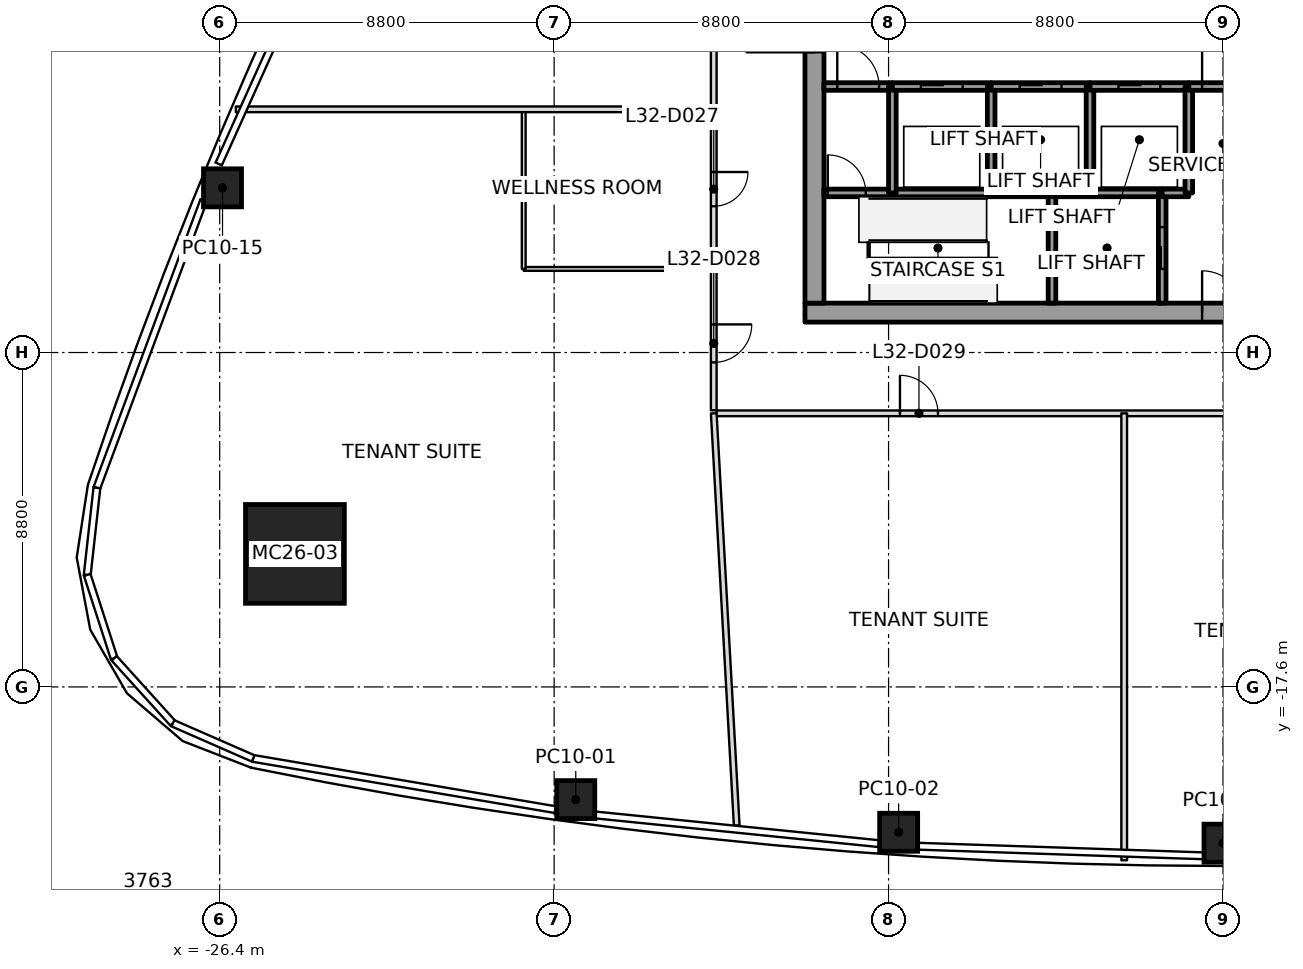
"""IFC4 building model, lengths in metres.
Left out: names, types, materials, properties, quantities, classifications, styles, units other than length and angle.
Written with IfcOpenShell. Run it as: python <this file> out.ifc"""

import sys

from ifc_helpers import new_model, si_unit, direction, frame, frame_2d, origin, origin_2d, place, context, subcontext, project, spatial, rectangle, extrude, element, fill, save


model = new_model("IFC4")
c1 = context("Model", 3, precision=1e-05, world=origin(), true_north=direction((0.0, 1.0)))
c2 = subcontext(c1, "Body", "Model", "MODEL_VIEW")
j1 = project(units=[si_unit("LENGTHUNIT", "METRE"), si_unit("PLANEANGLEUNIT", "RADIAN")], contexts=[c1])
p1 = place(None, origin())
s1 = spatial("IfcSite", under=j1, at=p1, CompositionType="ELEMENT")
p2 = place(p1, origin())
s2 = spatial("IfcBuilding", under=s1, at=p2, CompositionType="ELEMENT")
p3 = place(p2, frame((0.0, 0.0, 149.8)))
s3 = spatial("IfcBuildingStorey", under=s2, at=p3, CompositionType="ELEMENT", Elevation=149.8)
p4 = place(p3, frame((-24.421, -14.099, 0.0), z_axis=(0.02806141744, 0.01622681965, 0.999474485505), x_axis=(0.999606200887, -0.000455526946, -0.028057719863)))
e1 = element("IfcColumn", 1, at=p4, inside=s3, PredefinedType="COLUMN", context=c2, shape_type="SweptSolid", body=[
    extrude(rectangle(XDim=2.6, YDim=2.6, at=origin_2d()), origin(), (0.0, 0.0, 1.0), 4.002),
])
p5 = place(p3, frame((-17.031, -20.566, 0.0), z_axis=(0.017696448434, 0.010495824588, 0.999788314284), x_axis=(-0.9908324592, 0.134130035979, 0.016129824645)))
e2 = element("IfcColumn", 2, at=p5, inside=s3, PredefinedType="COLUMN", context=c2, shape_type="SweptSolid", body=[
    extrude(rectangle(XDim=1.0, YDim=1.0, at=origin_2d()), origin(), (0.0, 0.0, 1.0), 4.001),
])
p6 = place(p3, frame((-8.535, -21.425, 0.0), z_axis=(0.008849199152, 0.01116829962, 0.999898475225), x_axis=(-0.997705241451, 0.067223373028, 0.008078941818)))
e3 = element("IfcColumn", 3, at=p6, inside=s3, PredefinedType="COLUMN", context=c2, shape_type="SweptSolid", body=[
    extrude(rectangle(XDim=1.0, YDim=1.0, at=origin_2d()), origin(), (0.0, 0.0, 1.0), 4.0),
])
p7 = place(p3, frame((0.0, -21.711, 0.0), z_axis=(0.0, 0.01141283087, 0.999934871525), x_axis=(1.0, 0.0, 0.0)))
e4 = element("IfcColumn", 4, at=p7, inside=s3, PredefinedType="COLUMN", context=c2, shape_type="SweptSolid", body=[
    extrude(rectangle(XDim=1.0, YDim=1.0, at=origin_2d()), origin(), (0.0, 0.0, 1.0), 4.0),
])
p8 = place(p3, frame((-26.326, -4.466, 0.0), z_axis=(0.017879535448, 0.010068680372, 0.999789449778), x_axis=(0.379426178831, 0.925081893574, -0.016101707937)))
e5 = element("IfcColumn", 5, at=p8, inside=s3, PredefinedType="COLUMN", context=c2, shape_type="SweptSolid", body=[
    extrude(rectangle(XDim=1.0, YDim=1.0, at=origin_2d()), origin(), (0.0, 0.0, 1.0), 4.001),
])
p9 = place(p3, frame((-11.0, -7.75, 0.0), z_axis=(0.0, 0.0, 1.0), x_axis=(1.0, 0.0, 0.0)))
e6 = element("IfcWall", 6, at=p9, inside=s3, PredefinedType="SHEAR", context=c2, shape_type="SweptSolid", body=[
    extrude(rectangle(XDim=22.0, YDim=0.5, at=frame_2d((11.0, 0.0))), origin(), (0.0, 0.0, 1.0), 4.0),
])
p10 = place(p9, frame((10.45, 0.0, 0.0)))
e7 = element("IfcOpeningElement", 7, at=p10, cuts=e6, PredefinedType="OPENING", context=c2, shape_type="SweptSolid", body=[
    extrude(rectangle(XDim=1.1, YDim=2.1, at=frame_2d((0.55, 1.05))), frame((0.0, 0.25, 0.0), z_axis=(0.0, -1.0, 0.0), x_axis=(1.0, 0.0, 0.0)), (0.0, 0.0, 1.0), 0.5),
])
p11 = place(p3, frame((-10.75, -7.5, 0.0), z_axis=(0.0, 0.0, 1.0), x_axis=(0.0, 1.0, 0.0)))
e8 = element("IfcWall", 8, at=p11, inside=s3, PredefinedType="SHEAR", context=c2, shape_type="SweptSolid", body=[
    extrude(rectangle(XDim=15.0, YDim=0.5, at=frame_2d((7.5, 0.0))), origin(), (0.0, 0.0, 1.0), 4.0),
])
p12 = place(p11, frame((6.6, 0.0, 0.0)))
e9 = element("IfcOpeningElement", 9, at=p12, cuts=e8, PredefinedType="OPENING", context=c2, shape_type="SweptSolid", body=[
    extrude(rectangle(XDim=1.8, YDim=2.1, at=frame_2d((0.9, 1.05))), frame((0.0, 0.25, 0.0), z_axis=(0.0, -1.0, 0.0), x_axis=(1.0, 0.0, 0.0)), (0.0, 0.0, 1.0), 0.5),
])
p13 = place(p3, frame((-10.5, -4.6, 0.0), z_axis=(0.0, 0.0, 1.0), x_axis=(1.0, 0.0, 0.0)))
e10 = element("IfcWall", 10, at=p13, inside=s3, PredefinedType="SOLIDWALL", context=c2, shape_type="SweptSolid", body=[
    extrude(rectangle(XDim=1.8, YDim=0.2, at=frame_2d((0.9, 0.0))), origin(), (0.0, 0.0, 1.0), 3.85),
])
p14 = place(p13, frame((0.1, 0.0, 0.0)))
e11 = element("IfcOpeningElement", 11, at=p14, cuts=e10, PredefinedType="OPENING", context=c2, shape_type="SweptSolid", body=[
    extrude(rectangle(XDim=1.0, YDim=2.1, at=frame_2d((0.5, 1.05))), frame((0.0, 0.1, 0.0), z_axis=(0.0, -1.0, 0.0), x_axis=(1.0, 0.0, 0.0)), (0.0, 0.0, 1.0), 0.2),
])
p15 = place(p3, frame((-10.5, -1.8, 0.0), z_axis=(0.0, 0.0, 1.0), x_axis=(1.0, 0.0, 0.0)))
e12 = element("IfcWall", 12, at=p15, inside=s3, PredefinedType="SOLIDWALL", context=c2, shape_type="SweptSolid", body=[
    extrude(rectangle(XDim=1.8, YDim=0.2, at=frame_2d((0.9, 0.0))), origin(), (0.0, 0.0, 1.0), 3.85),
])
p16 = place(p15, frame((0.35, 0.0, 0.0)))
e13 = element("IfcOpeningElement", 13, at=p16, cuts=e12, PredefinedType="OPENING", context=c2, shape_type="SweptSolid", body=[
    extrude(rectangle(XDim=1.1, YDim=2.1, at=frame_2d((0.55, 1.05))), frame((0.0, 0.1, 0.0), z_axis=(0.0, -1.0, 0.0), x_axis=(1.0, 0.0, 0.0)), (0.0, 0.0, 1.0), 0.2),
])
p17 = place(p3, frame((-8.7, -4.6, 0.0), z_axis=(0.0, 0.0, 1.0), x_axis=(1.0, 0.0, 0.0)))
e14 = element("IfcWall", 14, at=p17, inside=s3, PredefinedType="SOLIDWALL", context=c2, shape_type="SweptSolid", body=[
    extrude(rectangle(XDim=2.6, YDim=0.2, at=frame_2d((1.3, 0.0))), origin(), (0.0, 0.0, 1.0), 3.85),
])
p18 = place(p3, frame((-8.7, -4.6, 0.0), z_axis=(0.0, 0.0, 1.0), x_axis=(0.0, 1.0, 0.0)))
e15 = element("IfcWall", 15, at=p18, inside=s3, PredefinedType="SOLIDWALL", context=c2, shape_type="SweptSolid", body=[
    extrude(rectangle(XDim=2.8, YDim=0.2, at=frame_2d((1.4, 0.0))), origin(), (0.0, 0.0, 1.0), 3.85),
])
p19 = place(p3, frame((-8.7, -1.8, 0.0), z_axis=(0.0, 0.0, 1.0), x_axis=(1.0, 0.0, 0.0)))
e16 = element("IfcWall", 16, at=p19, inside=s3, PredefinedType="SOLIDWALL", context=c2, shape_type="SweptSolid", body=[
    extrude(rectangle(XDim=2.6, YDim=0.2, at=frame_2d((1.3, 0.0))), origin(), (0.0, 0.0, 1.0), 3.85),
])
p20 = place(p19, frame((0.75, 0.0, 0.0)))
e17 = element("IfcOpeningElement", 17, at=p20, cuts=e16, PredefinedType="OPENING", context=c2, shape_type="SweptSolid", body=[
    extrude(rectangle(XDim=1.1, YDim=2.1, at=frame_2d((0.55, 1.05))), frame((0.0, 0.1, 0.0), z_axis=(0.0, -1.0, 0.0), x_axis=(1.0, 0.0, 0.0)), (0.0, 0.0, 1.0), 0.2),
])
p21 = place(p3, frame((-6.1, -4.6, 0.0), z_axis=(0.0, 0.0, 1.0), x_axis=(1.0, 0.0, 0.0)))
e18 = element("IfcWall", 18, at=p21, inside=s3, PredefinedType="SOLIDWALL", context=c2, shape_type="SweptSolid", body=[
    extrude(rectangle(XDim=1.6, YDim=0.2, at=frame_2d((0.8, 0.0))), origin(), (0.0, 0.0, 1.0), 3.85),
])
p22 = place(p3, frame((-6.1, -4.6, 0.0), z_axis=(0.0, 0.0, 1.0), x_axis=(0.0, 1.0, 0.0)))
e19 = element("IfcWall", 19, at=p22, inside=s3, PredefinedType="SOLIDWALL", context=c2, shape_type="SweptSolid", body=[
    extrude(rectangle(XDim=2.8, YDim=0.2, at=frame_2d((1.4, 0.0))), origin(), (0.0, 0.0, 1.0), 3.85),
])
p23 = place(p3, frame((-6.1, -1.8, 0.0), z_axis=(0.0, 0.0, 1.0), x_axis=(1.0, 0.0, 0.0)))
e20 = element("IfcWall", 20, at=p23, inside=s3, PredefinedType="SOLIDWALL", context=c2, shape_type="SweptSolid", body=[
    extrude(rectangle(XDim=2.6, YDim=0.2, at=frame_2d((1.3, 0.0))), origin(), (0.0, 0.0, 1.0), 3.85),
])
p24 = place(p23, frame((0.75, 0.0, 0.0)))
e21 = element("IfcOpeningElement", 21, at=p24, cuts=e20, PredefinedType="OPENING", context=c2, shape_type="SweptSolid", body=[
    extrude(rectangle(XDim=1.1, YDim=2.1, at=frame_2d((0.55, 1.05))), frame((0.0, 0.1, 0.0), z_axis=(0.0, -1.0, 0.0), x_axis=(1.0, 0.0, 0.0)), (0.0, 0.0, 1.0), 0.2),
])
p25 = place(p3, frame((-4.5, -4.6, 0.0), z_axis=(0.0, 0.0, 1.0), x_axis=(0.0, -1.0, 0.0)))
e22 = element("IfcWall", 22, at=p25, inside=s3, PredefinedType="SOLIDWALL", context=c2, shape_type="SweptSolid", body=[
    extrude(rectangle(XDim=2.9, YDim=0.2, at=frame_2d((1.45, 0.0))), origin(), (0.0, 0.0, 1.0), 3.85),
])
p26 = place(p3, frame((-4.5, -4.6, 0.0), z_axis=(0.0, 0.0, 1.0), x_axis=(1.0, 0.0, 0.0)))
e23 = element("IfcWall", 23, at=p26, inside=s3, PredefinedType="SOLIDWALL", context=c2, shape_type="SweptSolid", body=[
    extrude(rectangle(XDim=1.0, YDim=0.2, at=frame_2d((0.5, 0.0))), origin(), (0.0, 0.0, 1.0), 3.85),
])
p27 = place(p3, frame((-3.5, -4.6, 0.0), z_axis=(0.0, 0.0, 1.0), x_axis=(1.0, 0.0, 0.0)))
e24 = element("IfcWall", 24, at=p27, inside=s3, PredefinedType="SOLIDWALL", context=c2, shape_type="SweptSolid", body=[
    extrude(rectangle(XDim=1.9, YDim=0.2, at=frame_2d((0.95, 0.0))), origin(), (0.0, 0.0, 1.0), 3.85),
])
p28 = place(p3, frame((-3.5, -4.6, 0.0), z_axis=(0.0, 0.0, 1.0), x_axis=(0.0, 1.0, 0.0)))
e25 = element("IfcWall", 25, at=p28, inside=s3, PredefinedType="SOLIDWALL", context=c2, shape_type="SweptSolid", body=[
    extrude(rectangle(XDim=2.8, YDim=0.2, at=frame_2d((1.4, 0.0))), origin(), (0.0, 0.0, 1.0), 3.85),
])
p29 = place(p3, frame((-3.5, -1.8, 0.0), z_axis=(0.0, 0.0, 1.0), x_axis=(1.0, 0.0, 0.0)))
e26 = element("IfcWall", 26, at=p29, inside=s3, PredefinedType="SOLIDWALL", context=c2, shape_type="SweptSolid", body=[
    extrude(rectangle(XDim=2.6, YDim=0.2, at=frame_2d((1.3, 0.0))), origin(), (0.0, 0.0, 1.0), 3.85),
])
p30 = place(p29, frame((0.75, 0.0, 0.0)))
e27 = element("IfcOpeningElement", 27, at=p30, cuts=e26, PredefinedType="OPENING", context=c2, shape_type="SweptSolid", body=[
    extrude(rectangle(XDim=1.1, YDim=2.1, at=frame_2d((0.55, 1.05))), frame((0.0, 0.1, 0.0), z_axis=(0.0, -1.0, 0.0), x_axis=(1.0, 0.0, 0.0)), (0.0, 0.0, 1.0), 0.2),
])
p31 = place(p3, frame((-1.6, -7.5, 0.0), z_axis=(0.0, 0.0, 1.0), x_axis=(0.0, 1.0, 0.0)))
e28 = element("IfcWall", 28, at=p31, inside=s3, PredefinedType="SOLIDWALL", context=c2, shape_type="SweptSolid", body=[
    extrude(rectangle(XDim=2.9, YDim=0.2, at=frame_2d((1.45, 0.0))), origin(), (0.0, 0.0, 1.0), 3.85),
])
p32 = place(p31, frame((0.9, 0.0, 0.0)))
e29 = element("IfcOpeningElement", 29, at=p32, cuts=e28, PredefinedType="OPENING", context=c2, shape_type="SweptSolid", body=[
    extrude(rectangle(XDim=1.1, YDim=2.1, at=frame_2d((0.55, 1.05))), frame((0.0, 0.1, 0.0), z_axis=(0.0, -1.0, 0.0), x_axis=(1.0, 0.0, 0.0)), (0.0, 0.0, 1.0), 0.2),
])
p33 = place(p3, frame((-1.6, -4.6, 0.0), z_axis=(0.0, 0.0, 1.0), x_axis=(1.0, 0.0, 0.0)))
e30 = element("IfcWall", 30, at=p33, inside=s3, PredefinedType="SOLIDWALL", context=c2, shape_type="SweptSolid", body=[
    extrude(rectangle(XDim=0.7, YDim=0.2, at=frame_2d((0.35, 0.0))), origin(), (0.0, 0.0, 1.0), 3.85),
])
p34 = place(p3, frame((-0.9, -4.6, 0.0), z_axis=(0.0, 0.0, 1.0), x_axis=(0.0, 1.0, 0.0)))
e31 = element("IfcWall", 31, at=p34, inside=s3, PredefinedType="SOLIDWALL", context=c2, shape_type="SweptSolid", body=[
    extrude(rectangle(XDim=2.8, YDim=0.2, at=frame_2d((1.4, 0.0))), origin(), (0.0, 0.0, 1.0), 3.85),
])
p35 = place(p3, frame((-0.9, -1.8, 0.0), z_axis=(0.0, 0.0, 1.0), x_axis=(1.0, 0.0, 0.0)))
e32 = element("IfcWall", 32, at=p35, inside=s3, PredefinedType="SOLIDWALL", context=c2, shape_type="SweptSolid", body=[
    extrude(rectangle(XDim=1.8, YDim=0.2, at=frame_2d((0.9, 0.0))), origin(), (0.0, 0.0, 1.0), 3.85),
])
p36 = place(p35, frame((0.35, 0.0, 0.0)))
e33 = element("IfcOpeningElement", 33, at=p36, cuts=e32, PredefinedType="OPENING", context=c2, shape_type="SweptSolid", body=[
    extrude(rectangle(XDim=1.1, YDim=2.1, at=frame_2d((0.55, 1.05))), frame((0.0, 0.1, 0.0), z_axis=(0.0, -1.0, 0.0), x_axis=(1.0, 0.0, 0.0)), (0.0, 0.0, 1.0), 0.2),
])
p37 = place(p3, frame((-13.4, -2.4, 0.0), z_axis=(0.0, 0.0, 1.0), x_axis=(-1.0, 0.0, 0.0)))
e34 = element("IfcWall", 34, at=p37, inside=s3, PredefinedType="PARTITIONING", context=c2, shape_type="SweptSolid", body=[
    extrude(rectangle(XDim=12.576, YDim=0.15, at=frame_2d((6.288, 0.0))), origin(), (0.0, 0.0, 1.0), 3.234),
])
p38 = place(p3, frame((-13.4, -10.4, 0.0), z_axis=(0.0, 0.0, 1.0), x_axis=(0.055628111687, -0.998451557758, 0.0)))
e35 = element("IfcWall", 35, at=p38, inside=s3, PredefinedType="PARTITIONING", context=c2, shape_type="SweptSolid", body=[
    extrude(rectangle(XDim=10.862, YDim=0.15, at=frame_2d((5.431, 0.0))), origin(), (0.0, 0.0, 1.0), 3.234),
])
p39 = place(p3, frame((-2.6, -10.4, 0.0), z_axis=(0.0, 0.0, 1.0), x_axis=(0.0, -1.0, 0.0)))
e36 = element("IfcWall", 36, at=p39, inside=s3, PredefinedType="PARTITIONING", context=c2, shape_type="SweptSolid", body=[
    extrude(rectangle(XDim=11.762, YDim=0.15, at=frame_2d((5.881, 0.0))), origin(), (0.0, 0.0, 1.0), 3.234),
])
p40 = place(p3, frame((-13.4, 10.32, 0.0), z_axis=(0.0, 0.0, 1.0), x_axis=(0.0, -1.0, 0.0)))
e37 = element("IfcWall", 37, at=p40, inside=s3, PredefinedType="PARTITIONING", context=c2, shape_type="SweptSolid", body=[
    extrude(rectangle(XDim=20.64, YDim=0.15, at=frame_2d((10.32, 0.0))), origin(), (0.0, 0.0, 1.0), 3.166),
])
p41 = place(p40, frame((5.82, 0.0, 0.0)))
e38 = element("IfcOpeningElement", 38, at=p41, cuts=e37, PredefinedType="OPENING", context=c2, shape_type="SweptSolid", body=[
    extrude(rectangle(XDim=1.0, YDim=2.1, at=frame_2d((0.5, 1.05))), frame((0.0, 0.075, 0.0), z_axis=(0.0, -1.0, 0.0), x_axis=(1.0, 0.0, 0.0)), (0.0, 0.0, 1.0), 0.15),
])
p42 = place(p40, frame((14.37, 0.0, 0.0)))
e39 = element("IfcOpeningElement", 39, at=p42, cuts=e37, PredefinedType="OPENING", context=c2, shape_type="SweptSolid", body=[
    extrude(rectangle(XDim=0.9, YDim=2.1, at=frame_2d((0.45, 1.05))), frame((0.0, 0.075, 0.0), z_axis=(0.0, -1.0, 0.0), x_axis=(1.0, 0.0, 0.0)), (0.0, 0.0, 1.0), 0.15),
])
p43 = place(p40, frame((18.38, 0.0, 0.0)))
e40 = element("IfcOpeningElement", 40, at=p43, cuts=e37, PredefinedType="OPENING", context=c2, shape_type="SweptSolid", body=[
    extrude(rectangle(XDim=1.0, YDim=2.1, at=frame_2d((0.5, 1.05))), frame((0.0, 0.075, 0.0), z_axis=(0.0, -1.0, 0.0), x_axis=(1.0, 0.0, 0.0)), (0.0, 0.0, 1.0), 0.15),
])
p44 = place(p3, frame((-13.32, -10.4, 0.0), z_axis=(0.0, 0.0, 1.0), x_axis=(1.0, 0.0, 0.0)))
e41 = element("IfcWall", 41, at=p44, inside=s3, PredefinedType="PARTITIONING", context=c2, shape_type="SweptSolid", body=[
    extrude(rectangle(XDim=26.64, YDim=0.15, at=frame_2d((13.32, 0.0))), origin(), (0.0, 0.0, 1.0), 3.317),
])
p45 = place(p44, frame((4.82, 0.0, 0.0)))
e42 = element("IfcOpeningElement", 42, at=p45, cuts=e41, PredefinedType="OPENING", context=c2, shape_type="SweptSolid", body=[
    extrude(rectangle(XDim=1.0, YDim=2.1, at=frame_2d((0.5, 1.05))), frame((0.0, 0.075, 0.0), z_axis=(0.0, -1.0, 0.0), x_axis=(1.0, 0.0, 0.0)), (0.0, 0.0, 1.0), 0.15),
])
p46 = place(p44, frame((14.22, 0.0, 0.0)))
e43 = element("IfcOpeningElement", 43, at=p46, cuts=e41, PredefinedType="OPENING", context=c2, shape_type="SweptSolid", body=[
    extrude(rectangle(XDim=1.0, YDim=2.1, at=frame_2d((0.5, 1.05))), frame((0.0, 0.075, 0.0), z_axis=(0.0, -1.0, 0.0), x_axis=(1.0, 0.0, 0.0)), (0.0, 0.0, 1.0), 0.15),
])
p47 = place(p44, frame((22.22, 0.0, 0.0)))
e44 = element("IfcOpeningElement", 44, at=p47, cuts=e41, PredefinedType="OPENING", context=c2, shape_type="SweptSolid", body=[
    extrude(rectangle(XDim=1.0, YDim=2.1, at=frame_2d((0.5, 1.05))), frame((0.0, 0.075, 0.0), z_axis=(0.0, -1.0, 0.0), x_axis=(1.0, 0.0, 0.0)), (0.0, 0.0, 1.0), 0.15),
])
p48 = place(p3, frame((-13.43, -6.6, 0.0), z_axis=(0.0, 0.0, 1.0), x_axis=(-1.0, 0.0, 0.0)))
e45 = element("IfcWall", 45, at=p48, inside=s3, PredefinedType="PARTITIONING", context=c2, shape_type="SweptSolid", body=[
    extrude(rectangle(XDim=4.97, YDim=0.1, at=frame_2d((2.485, 0.0))), origin(), (0.0, 0.0, 1.0), 3.247),
])
p49 = place(p3, frame((-18.4, -6.6, 0.0), z_axis=(0.0, 0.0, 1.0), x_axis=(0.0, 1.0, 0.0)))
e46 = element("IfcWall", 46, at=p49, inside=s3, PredefinedType="PARTITIONING", context=c2, shape_type="SweptSolid", body=[
    extrude(rectangle(XDim=4.17, YDim=0.1, at=frame_2d((2.085, 0.0))), origin(), (0.0, 0.0, 1.0), 3.247),
])
p50 = place(p42, origin())
e47 = element("IfcDoor", 47, at=p50, inside=s3, OperationType="SINGLE_SWING_LEFT", PredefinedType="DOOR", context=c2, shape_type="SweptSolid", body=[
    extrude(rectangle(XDim=0.9, YDim=2.1, at=frame_2d((0.45, 1.05))), frame((0.0, 0.025, 0.0), z_axis=(0.0, -1.0, 0.0), x_axis=(1.0, 0.0, 0.0)), (0.0, 0.0, 1.0), 0.05),
])
fill(e39, e47)
p51 = place(p43, origin())
e48 = element("IfcDoor", 48, at=p51, inside=s3, OperationType="SINGLE_SWING_LEFT", PredefinedType="DOOR", context=c2, shape_type="SweptSolid", body=[
    extrude(rectangle(XDim=1.0, YDim=2.1, at=frame_2d((0.5, 1.05))), frame((0.0, 0.025, 0.0), z_axis=(0.0, -1.0, 0.0), x_axis=(1.0, 0.0, 0.0)), (0.0, 0.0, 1.0), 0.05),
])
fill(e40, e48)
p52 = place(p45, origin())
e49 = element("IfcDoor", 49, at=p52, inside=s3, OperationType="SINGLE_SWING_LEFT", PredefinedType="DOOR", context=c2, shape_type="SweptSolid", body=[
    extrude(rectangle(XDim=1.0, YDim=2.1, at=frame_2d((0.5, 1.05))), frame((0.0, 0.025, 0.0), z_axis=(0.0, -1.0, 0.0), x_axis=(1.0, 0.0, 0.0)), (0.0, 0.0, 1.0), 0.05),
])
fill(e42, e49)
p53 = place(p20, origin())
e50 = element("IfcDoor", 50, at=p53, inside=s3, OperationType="SLIDING_TO_RIGHT", PredefinedType="DOOR", context=c2, shape_type="SweptSolid", body=[
    extrude(rectangle(XDim=1.1, YDim=2.1, at=frame_2d((0.55, 1.05))), frame((0.0, 0.025, 0.0), z_axis=(0.0, -1.0, 0.0), x_axis=(1.0, 0.0, 0.0)), (0.0, 0.0, 1.0), 0.05),
])
fill(e17, e50)
p54 = place(p24, origin())
e51 = element("IfcDoor", 51, at=p54, inside=s3, OperationType="SLIDING_TO_LEFT", PredefinedType="DOOR", context=c2, shape_type="SweptSolid", body=[
    extrude(rectangle(XDim=1.1, YDim=2.1, at=frame_2d((0.55, 1.05))), frame((0.0, 0.025, 0.0), z_axis=(0.0, -1.0, 0.0), x_axis=(1.0, 0.0, 0.0)), (0.0, 0.0, 1.0), 0.05),
])
fill(e21, e51)
p55 = place(p30, origin())
e52 = element("IfcDoor", 52, at=p55, inside=s3, OperationType="SLIDING_TO_LEFT", PredefinedType="DOOR", context=c2, shape_type="SweptSolid", body=[
    extrude(rectangle(XDim=1.1, YDim=2.1, at=frame_2d((0.55, 1.05))), frame((0.0, 0.025, 0.0), z_axis=(0.0, -1.0, 0.0), x_axis=(1.0, 0.0, 0.0)), (0.0, 0.0, 1.0), 0.05),
])
fill(e27, e52)
p56 = place(p32, origin())
e53 = element("IfcDoor", 53, at=p56, inside=s3, OperationType="SLIDING_TO_RIGHT", PredefinedType="DOOR", context=c2, shape_type="SweptSolid", body=[
    extrude(rectangle(XDim=1.1, YDim=2.1, at=frame_2d((0.55, 1.05))), frame((0.0, 0.025, 0.0), z_axis=(0.0, -1.0, 0.0), x_axis=(1.0, 0.0, 0.0)), (0.0, 0.0, 1.0), 0.05),
])
fill(e29, e53)
p57 = place(p16, origin())
e54 = element("IfcDoor", 54, at=p57, inside=s3, OperationType="SINGLE_SWING_RIGHT", PredefinedType="DOOR", context=c2, shape_type="SweptSolid", body=[
    extrude(rectangle(XDim=1.1, YDim=2.1, at=frame_2d((0.55, 1.05))), frame((0.0, 0.025, 0.0), z_axis=(0.0, -1.0, 0.0), x_axis=(1.0, 0.0, 0.0)), (0.0, 0.0, 1.0), 0.05),
])
fill(e13, e54)
p58 = place(p36, origin())
e55 = element("IfcDoor", 55, at=p58, inside=s3, OperationType="SINGLE_SWING_LEFT", PredefinedType="DOOR", context=c2, shape_type="SweptSolid", body=[
    extrude(rectangle(XDim=1.1, YDim=2.1, at=frame_2d((0.55, 1.05))), frame((0.0, 0.025, 0.0), z_axis=(0.0, -1.0, 0.0), x_axis=(1.0, 0.0, 0.0)), (0.0, 0.0, 1.0), 0.05),
])
fill(e33, e55)
p59 = place(p14, origin())
e56 = element("IfcDoor", 56, at=p59, inside=s3, OperationType="SINGLE_SWING_LEFT", PredefinedType="DOOR", context=c2, shape_type="SweptSolid", body=[
    extrude(rectangle(XDim=1.0, YDim=2.1, at=frame_2d((0.5, 1.05))), frame((0.0, 0.025, 0.0), z_axis=(0.0, -1.0, 0.0), x_axis=(1.0, 0.0, 0.0)), (0.0, 0.0, 1.0), 0.05),
])
fill(e11, e56)
p60 = place(p12, origin())
e57 = element("IfcDoor", 57, at=p60, inside=s3, OperationType="DOUBLE_DOOR_SINGLE_SWING", PredefinedType="DOOR", context=c2, shape_type="SweptSolid", body=[
    extrude(rectangle(XDim=1.8, YDim=2.1, at=frame_2d((0.9, 1.05))), frame((0.0, 0.025, 0.0), z_axis=(0.0, -1.0, 0.0), x_axis=(1.0, 0.0, 0.0)), (0.0, 0.0, 1.0), 0.05),
])
fill(e9, e57)
p61 = place(p10, origin())
e58 = element("IfcDoor", 58, at=p61, inside=s3, OperationType="SINGLE_SWING_LEFT", PredefinedType="DOOR", context=c2, shape_type="SweptSolid", body=[
    extrude(rectangle(XDim=1.1, YDim=2.1, at=frame_2d((0.55, 1.05))), frame((0.0, 0.025, 0.0), z_axis=(0.0, -1.0, 0.0), x_axis=(1.0, 0.0, 0.0)), (0.0, 0.0, 1.0), 0.05),
])
fill(e7, e58)
save(model, sys.argv[1])
